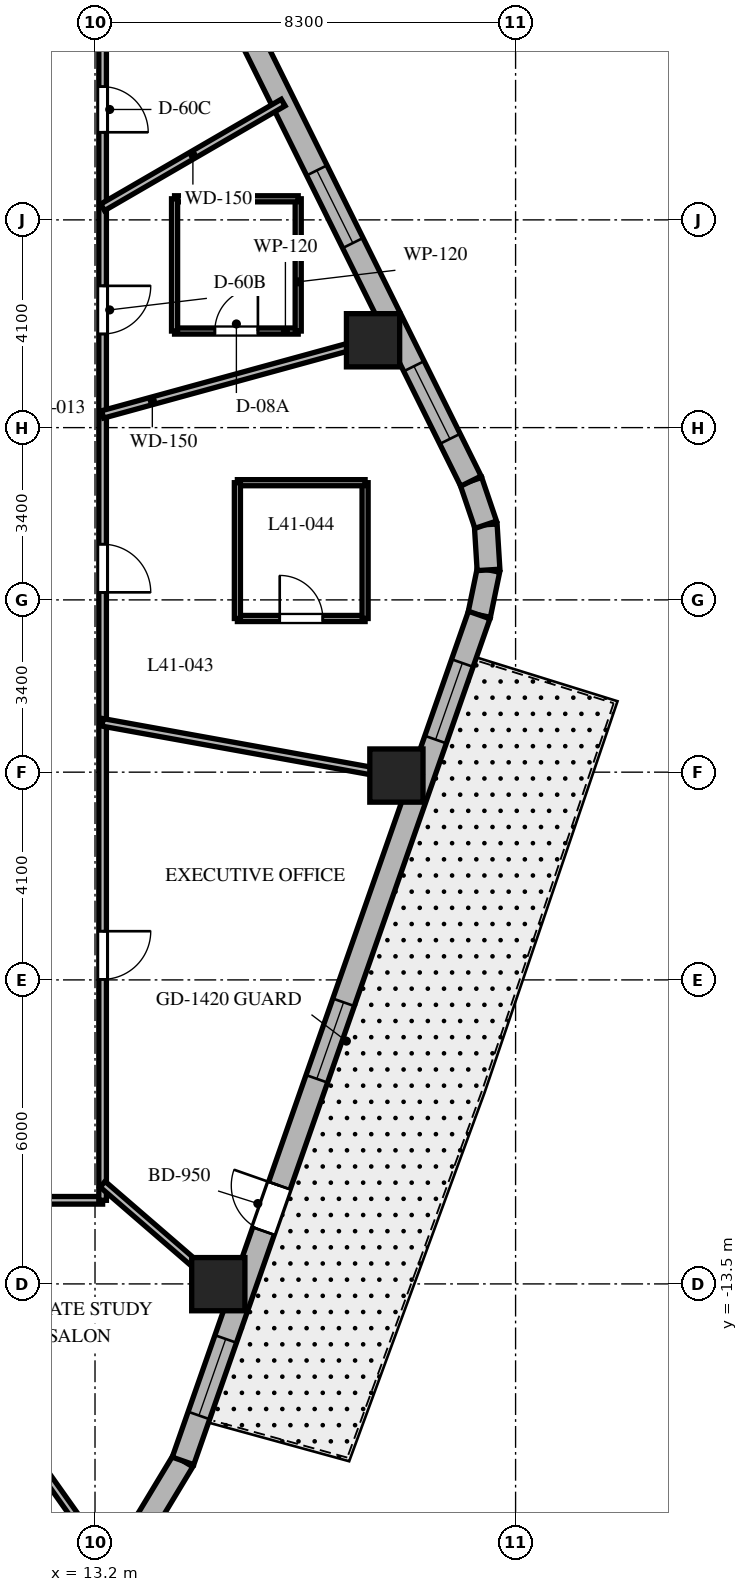
"""IFC4 building model, lengths in metres.
Left out: names, types, materials, properties, quantities, classifications, styles, units other than length and angle.
Written with IfcOpenShell. Run it as: python <this file> out.ifc"""

import sys

from ifc_helpers import new_model, si_unit, direction, frame, frame_2d, origin, origin_2d, place, context, subcontext, project, spatial, rectangle, extrude, element, fill, save


model = new_model("IFC4")
c1 = context("Model", 3, precision=1e-05, world=origin(), true_north=direction((0.0, 1.0)))
c2 = subcontext(c1, "Body", "Model", "MODEL_VIEW")
j1 = project(units=[si_unit("LENGTHUNIT", "METRE"), si_unit("PLANEANGLEUNIT", "RADIAN")], contexts=[c1])
p1 = place(None, origin())
s1 = spatial("IfcSite", under=j1, at=p1, CompositionType="ELEMENT")
p2 = place(p1, origin())
s2 = spatial("IfcBuilding", under=s1, at=p2, CompositionType="ELEMENT")
p3 = place(p2, frame((0.0, 0.0, 166.5)))
s3 = spatial("IfcBuildingStorey", under=s2, at=p3, CompositionType="ELEMENT", Elevation=166.5)
for number, where, z_axis, x_axis in (
    (1, (15.633, -13.505, 0.0), (0.0, 0.0, 1.0), (1.0, 0.0, 0.0)),
    (2, (19.148, -3.467, 0.0), (0.0, 0.0, 1.0), (1.0, 0.0, 0.0)),
    (3, (18.687, 5.124, 0.0), (0.0, 0.0, 1.0), (1.0, 0.0, 0.0)),
):
    element("IfcColumn", number, at=place(p3, frame(where, z_axis=z_axis, x_axis=x_axis)), inside=s3, PredefinedType="COLUMN", context=c2, shape_type="SweptSolid", body=[
        extrude(rectangle(XDim=1.05, YDim=1.05, at=origin_2d()), origin(), (0.0, 0.0, 1.0), 3.7),
    ])
p4 = place(p3, frame((14.214, -18.192, 0.0), z_axis=(0.0, 0.0, 1.0), x_axis=(0.516340945502, 0.856383108193, 0.0)))
e4 = element("IfcWall", 4, at=p4, inside=s3, PredefinedType="SOLIDWALL", context=c2, shape_type="SweptSolid", body=[
    extrude(rectangle(XDim=1.4, YDim=0.45, at=frame_2d((0.7, 0.0))), origin(), (0.0, 0.0, 1.0), 3.38),
])
p5 = place(p3, frame((20.782, -0.298, 0.0), z_axis=(0.0, 0.0, 1.0), x_axis=(0.202570068411, 0.979267771033, 0.0)))
e5 = element("IfcWall", 5, at=p5, inside=s3, PredefinedType="SOLIDWALL", context=c2, shape_type="SweptSolid", body=[
    extrude(rectangle(XDim=0.909, YDim=0.45, at=frame_2d((0.454, 0.0))), origin(), (0.0, 0.0, 1.0), 3.38),
])
p6 = place(p3, frame((20.966, 0.592, 0.0), z_axis=(0.0, 0.0, 1.0), x_axis=(-0.061748898935, 0.998091715966, 0.0)))
e6 = element("IfcWall", 6, at=p6, inside=s3, PredefinedType="SOLIDWALL", context=c2, shape_type="SweptSolid", body=[
    extrude(rectangle(XDim=0.894, YDim=0.45, at=frame_2d((0.447, 0.0))), origin(), (0.0, 0.0, 1.0), 3.38),
])
p7 = place(p3, frame((20.911, 1.484, 0.0), z_axis=(0.0, 0.0, 1.0), x_axis=(-0.321623334353, 0.946867694453, 0.0)))
e7 = element("IfcWall", 7, at=p7, inside=s3, PredefinedType="SOLIDWALL", context=c2, shape_type="SweptSolid", body=[
    extrude(rectangle(XDim=0.909, YDim=0.45, at=frame_2d((0.454, 0.0))), origin(), (0.0, 0.0, 1.0), 3.38),
])
p8 = place(p3, frame((14.937, -16.993, 0.0), z_axis=(0.0, 0.0, 1.0), x_axis=(0.330431575061, 0.943829949834, 0.0)))
e8 = element("IfcWall", 8, at=p8, inside=s3, PredefinedType="SOLIDWALL", context=c2, shape_type="SweptSolid", body=[
    extrude(rectangle(XDim=17.689, YDim=0.45, at=frame_2d((8.844, 0.0))), origin(), (0.0, 0.0, 1.0), 3.38),
])
p9 = place(p8, frame((4.807, 0.0, 0.0)))
e9 = element("IfcOpeningElement", 9, at=p9, cuts=e8, PredefinedType="OPENING", context=c2, shape_type="SweptSolid", body=[
    extrude(rectangle(XDim=0.95, YDim=2.15, at=frame_2d((0.475, 1.075))), frame((0.0, 0.235, 0.0), z_axis=(0.0, -1.0, 0.0), x_axis=(1.0, 0.0, 0.0)), (0.0, 0.0, 1.0), 0.47),
])
p10 = place(p8, frame((0.95, 0.0, 0.8)))
e10 = element("IfcOpeningElement", 10, at=p10, cuts=e8, PredefinedType="OPENING", context=c2, shape_type="SweptSolid", body=[
    extrude(rectangle(XDim=1.6, YDim=1.75, at=frame_2d((0.8, 0.875))), frame((0.0, 0.235, 0.0), z_axis=(0.0, -1.0, 0.0), x_axis=(1.0, 0.0, 0.0)), (0.0, 0.0, 1.0), 0.47),
])
p11 = place(p8, frame((7.99, 0.0, 0.8)))
e11 = element("IfcOpeningElement", 11, at=p11, cuts=e8, PredefinedType="OPENING", context=c2, shape_type="SweptSolid", body=[
    extrude(rectangle(XDim=1.6, YDim=1.75, at=frame_2d((0.8, 0.875))), frame((0.0, 0.235, 0.0), z_axis=(0.0, -1.0, 0.0), x_axis=(1.0, 0.0, 0.0)), (0.0, 0.0, 1.0), 0.47),
])
p12 = place(p8, frame((15.084, 0.0, 0.8)))
e12 = element("IfcOpeningElement", 12, at=p12, cuts=e8, PredefinedType="OPENING", context=c2, shape_type="SweptSolid", body=[
    extrude(rectangle(XDim=1.6, YDim=1.75, at=frame_2d((0.8, 0.875))), frame((0.0, 0.235, 0.0), z_axis=(0.0, -1.0, 0.0), x_axis=(1.0, 0.0, 0.0)), (0.0, 0.0, 1.0), 0.47),
])
p13 = place(p3, frame((20.618, 2.344, 0.0), z_axis=(0.0, 0.0, 1.0), x_axis=(-0.444243691097, 0.895905990002, 0.0)))
e13 = element("IfcWall", 13, at=p13, inside=s3, PredefinedType="SOLIDWALL", context=c2, shape_type="SweptSolid", body=[
    extrude(rectangle(XDim=16.784, YDim=0.45, at=frame_2d((8.392, 0.0))), origin(), (0.0, 0.0, 1.0), 3.38),
])
p14 = place(p13, frame((5.245, 0.0, 0.8)))
e14 = element("IfcOpeningElement", 14, at=p14, cuts=e13, PredefinedType="OPENING", context=c2, shape_type="SweptSolid", body=[
    extrude(rectangle(XDim=1.6, YDim=1.75, at=frame_2d((0.8, 0.875))), frame((0.0, 0.235, 0.0), z_axis=(0.0, -1.0, 0.0), x_axis=(1.0, 0.0, 0.0)), (0.0, 0.0, 1.0), 0.47),
])
p15 = place(p13, frame((9.936, 0.0, 0.8)))
e15 = element("IfcOpeningElement", 15, at=p15, cuts=e13, PredefinedType="OPENING", context=c2, shape_type="SweptSolid", body=[
    extrude(rectangle(XDim=1.6, YDim=1.75, at=frame_2d((0.8, 0.875))), frame((0.0, 0.235, 0.0), z_axis=(0.0, -1.0, 0.0), x_axis=(1.0, 0.0, 0.0)), (0.0, 0.0, 1.0), 0.47),
])
p16 = place(p13, frame((14.303, 0.0, 0.8)))
e16 = element("IfcOpeningElement", 16, at=p16, cuts=e13, PredefinedType="OPENING", context=c2, shape_type="SweptSolid", body=[
    extrude(rectangle(XDim=1.6, YDim=1.75, at=frame_2d((0.8, 0.875))), frame((0.0, 0.235, 0.0), z_axis=(0.0, -1.0, 0.0), x_axis=(1.0, 0.0, 0.0)), (0.0, 0.0, 1.0), 0.47),
])
p17 = place(p13, frame((0.931, 0.0, 0.8)))
e17 = element("IfcOpeningElement", 17, at=p17, cuts=e13, PredefinedType="OPENING", context=c2, shape_type="SweptSolid", body=[
    extrude(rectangle(XDim=1.6, YDim=1.75, at=frame_2d((0.8, 0.875))), frame((0.0, 0.235, 0.0), z_axis=(0.0, -1.0, 0.0), x_axis=(1.0, 0.0, 0.0)), (0.0, 0.0, 1.0), 0.47),
])
p18 = place(p3, frame((13.35, -11.85, 0.0), z_axis=(0.0, 0.0, 1.0), x_axis=(-1.0, 0.0, 0.0)))
e18 = element("IfcWall", 18, at=p18, inside=s3, PredefinedType="PARTITIONING", context=c2, shape_type="SweptSolid", body=[
    extrude(rectangle(XDim=26.7, YDim=0.15, at=frame_2d((13.35, 0.0))), origin(), (0.0, 0.0, 1.0), 2.82),
])
p19 = place(p18, frame((20.682, 0.0, 0.0)))
e19 = element("IfcOpeningElement", 19, at=p19, cuts=e18, PredefinedType="OPENING", context=c2, shape_type="SweptSolid", body=[
    extrude(rectangle(XDim=0.95, YDim=2.03, at=frame_2d((0.475, 1.015))), frame((0.0, 0.085, 0.0), z_axis=(0.0, -1.0, 0.0), x_axis=(1.0, 0.0, 0.0)), (0.0, 0.0, 1.0), 0.17),
])
p20 = place(p18, frame((14.708, 0.0, 0.0)))
e20 = element("IfcOpeningElement", 20, at=p20, cuts=e18, PredefinedType="OPENING", context=c2, shape_type="SweptSolid", body=[
    extrude(rectangle(XDim=0.95, YDim=2.03, at=frame_2d((0.475, 1.015))), frame((0.0, 0.085, 0.0), z_axis=(0.0, -1.0, 0.0), x_axis=(1.0, 0.0, 0.0)), (0.0, 0.0, 1.0), 0.17),
])
p21 = place(p18, frame((10.553, 0.0, 0.0)))
e21 = element("IfcOpeningElement", 21, at=p21, cuts=e18, PredefinedType="OPENING", context=c2, shape_type="SweptSolid", body=[
    extrude(rectangle(XDim=0.95, YDim=2.03, at=frame_2d((0.475, 1.015))), frame((0.0, 0.085, 0.0), z_axis=(0.0, -1.0, 0.0), x_axis=(1.0, 0.0, 0.0)), (0.0, 0.0, 1.0), 0.17),
])
p22 = place(p18, frame((6.353, 0.0, 0.0)))
e22 = element("IfcOpeningElement", 22, at=p22, cuts=e18, PredefinedType="OPENING", context=c2, shape_type="SweptSolid", body=[
    extrude(rectangle(XDim=0.9, YDim=2.03, at=frame_2d((0.45, 1.015))), frame((0.0, 0.085, 0.0), z_axis=(0.0, -1.0, 0.0), x_axis=(1.0, 0.0, 0.0)), (0.0, 0.0, 1.0), 0.17),
])
p23 = place(p18, frame((2.15, 0.0, 0.0)))
e23 = element("IfcOpeningElement", 23, at=p23, cuts=e18, PredefinedType="OPENING", context=c2, shape_type="SweptSolid", body=[
    extrude(rectangle(XDim=0.9, YDim=2.03, at=frame_2d((0.45, 1.015))), frame((0.0, 0.085, 0.0), z_axis=(0.0, -1.0, 0.0), x_axis=(1.0, 0.0, 0.0)), (0.0, 0.0, 1.0), 0.17),
])
p24 = place(p3, frame((13.35, 11.85, 0.0), z_axis=(0.0, 0.0, 1.0), x_axis=(0.0, -1.0, 0.0)))
e24 = element("IfcWall", 24, at=p24, inside=s3, PredefinedType="PARTITIONING", context=c2, shape_type="SweptSolid", body=[
    extrude(rectangle(XDim=23.7, YDim=0.15, at=frame_2d((11.85, 0.0))), origin(), (0.0, 0.0, 1.0), 2.82),
])
p25 = place(p24, frame((5.652, 0.0, 0.0)))
e25 = element("IfcOpeningElement", 25, at=p25, cuts=e24, PredefinedType="OPENING", context=c2, shape_type="SweptSolid", body=[
    extrude(rectangle(XDim=0.95, YDim=2.03, at=frame_2d((0.475, 1.015))), frame((0.0, 0.085, 0.0), z_axis=(0.0, -1.0, 0.0), x_axis=(1.0, 0.0, 0.0)), (0.0, 0.0, 1.0), 0.17),
])
p26 = place(p24, frame((1.721, 0.0, 0.0)))
e26 = element("IfcOpeningElement", 26, at=p26, cuts=e24, PredefinedType="OPENING", context=c2, shape_type="SweptSolid", body=[
    extrude(rectangle(XDim=0.9, YDim=2.03, at=frame_2d((0.45, 1.015))), frame((0.0, 0.085, 0.0), z_axis=(0.0, -1.0, 0.0), x_axis=(1.0, 0.0, 0.0)), (0.0, 0.0, 1.0), 0.17),
])
p27 = place(p24, frame((18.389, 0.0, 0.0)))
e27 = element("IfcOpeningElement", 27, at=p27, cuts=e24, PredefinedType="OPENING", context=c2, shape_type="SweptSolid", body=[
    extrude(rectangle(XDim=0.95, YDim=2.03, at=frame_2d((0.475, 1.015))), frame((0.0, 0.085, 0.0), z_axis=(0.0, -1.0, 0.0), x_axis=(1.0, 0.0, 0.0)), (0.0, 0.0, 1.0), 0.17),
])
p28 = place(p24, frame((10.751, 0.0, 0.0)))
e28 = element("IfcOpeningElement", 28, at=p28, cuts=e24, PredefinedType="OPENING", context=c2, shape_type="SweptSolid", body=[
    extrude(rectangle(XDim=0.95, YDim=2.03, at=frame_2d((0.475, 1.015))), frame((0.0, 0.085, 0.0), z_axis=(0.0, -1.0, 0.0), x_axis=(1.0, 0.0, 0.0)), (0.0, 0.0, 1.0), 0.17),
])
p29 = place(p3, frame((13.35, 3.661, 0.0), z_axis=(0.0, 0.0, 1.0), x_axis=(0.964397145454, 0.264458211898, 0.0)))
e29 = element("IfcWall", 29, at=p29, inside=s3, PredefinedType="PARTITIONING", context=c2, shape_type="SweptSolid", body=[
    extrude(rectangle(XDim=6.039, YDim=0.15, at=frame_2d((3.019, 0.0))), origin(), (0.0, 0.0, 1.0), 2.62),
])
p30 = place(p3, frame((13.35, 7.748, 0.0), z_axis=(0.0, 0.0, 1.0), x_axis=(0.864894342526, 0.501953958313, 0.0)))
e30 = element("IfcWall", 30, at=p30, inside=s3, PredefinedType="PARTITIONING", context=c2, shape_type="SweptSolid", body=[
    extrude(rectangle(XDim=4.12, YDim=0.15, at=frame_2d((2.06, 0.0))), origin(), (0.0, 0.0, 1.0), 2.62),
])
p31 = place(p3, frame((8.39, -11.85, 0.0), z_axis=(0.0, 0.0, 1.0), x_axis=(0.577877530264, -0.816123495566, 0.0)))
e31 = element("IfcWall", 31, at=p31, inside=s3, PredefinedType="PARTITIONING", context=c2, shape_type="SweptSolid", body=[
    extrude(rectangle(XDim=8.382, YDim=0.15, at=frame_2d((4.191, 0.0))), origin(), (0.0, 0.0, 1.0), 2.62),
])
p32 = place(p3, frame((13.35, -11.533, 0.0), z_axis=(0.0, 0.0, 1.0), x_axis=(0.756711647314, -0.65374879183, 0.0)))
e32 = element("IfcWall", 32, at=p32, inside=s3, PredefinedType="PARTITIONING", context=c2, shape_type="SweptSolid", body=[
    extrude(rectangle(XDim=3.55, YDim=0.15, at=frame_2d((1.775, 0.0))), origin(), (0.0, 0.0, 1.0), 2.62),
])
p33 = place(p3, frame((13.35, -2.417, 0.0), z_axis=(0.0, 0.0, 1.0), x_axis=(0.98399796473, -0.178179699761, 0.0)))
e33 = element("IfcWall", 33, at=p33, inside=s3, PredefinedType="PARTITIONING", context=c2, shape_type="SweptSolid", body=[
    extrude(rectangle(XDim=6.393, YDim=0.15, at=frame_2d((3.197, 0.0))), origin(), (0.0, 0.0, 1.0), 2.62),
])
p34 = place(p3, frame((14.77, 5.306, 0.0), z_axis=(0.0, 0.0, 1.0), x_axis=(1.0, 0.0, 0.0)))
e34 = element("IfcWall", 34, at=p34, inside=s3, PredefinedType="PARTITIONING", context=c2, shape_type="SweptSolid", body=[
    extrude(rectangle(XDim=2.44, YDim=0.12, at=frame_2d((1.22, 0.0))), origin(), (0.0, 0.0, 1.0), 2.82),
])
p35 = place(p34, frame((0.795, 0.0, 0.0)))
e35 = element("IfcOpeningElement", 35, at=p35, cuts=e34, PredefinedType="OPENING", context=c2, shape_type="SweptSolid", body=[
    extrude(rectangle(XDim=0.85, YDim=2.03, at=frame_2d((0.425, 1.015))), frame((0.0, 0.07, 0.0), z_axis=(0.0, -1.0, 0.0), x_axis=(1.0, 0.0, 0.0)), (0.0, 0.0, 1.0), 0.14),
])
p36 = place(p3, frame((17.21, 5.306, 0.0), z_axis=(0.0, 0.0, 1.0), x_axis=(0.0, 1.0, 0.0)))
e36 = element("IfcWall", 36, at=p36, inside=s3, PredefinedType="PARTITIONING", context=c2, shape_type="SweptSolid", body=[
    extrude(rectangle(XDim=2.61, YDim=0.12, at=frame_2d((1.305, 0.0))), origin(), (0.0, 0.0, 1.0), 2.62),
])
p37 = place(p3, frame((17.21, 7.916, 0.0), z_axis=(0.0, 0.0, 1.0), x_axis=(-1.0, 0.0, 0.0)))
e37 = element("IfcWall", 37, at=p37, inside=s3, PredefinedType="PARTITIONING", context=c2, shape_type="SweptSolid", body=[
    extrude(rectangle(XDim=2.44, YDim=0.12, at=frame_2d((1.22, 0.0))), origin(), (0.0, 0.0, 1.0), 2.62),
])
p38 = place(p3, frame((14.77, 7.916, 0.0), z_axis=(0.0, 0.0, 1.0), x_axis=(0.0, -1.0, 0.0)))
e38 = element("IfcWall", 38, at=p38, inside=s3, PredefinedType="PARTITIONING", context=c2, shape_type="SweptSolid", body=[
    extrude(rectangle(XDim=2.61, YDim=0.12, at=frame_2d((1.305, 0.0))), origin(), (0.0, 0.0, 1.0), 2.82),
])
p39 = place(p3, frame((16.01, -0.367, 0.0), z_axis=(0.0, 0.0, 1.0), x_axis=(1.0, 0.0, 0.0)))
e39 = element("IfcWall", 39, at=p39, inside=s3, PredefinedType="PARTITIONING", context=c2, shape_type="SweptSolid", body=[
    extrude(rectangle(XDim=2.52, YDim=0.12, at=frame_2d((1.26, 0.0))), origin(), (0.0, 0.0, 1.0), 3.38),
])
p40 = place(p39, frame((0.835, 0.0, 0.0)))
e40 = element("IfcOpeningElement", 40, at=p40, cuts=e39, PredefinedType="OPENING", context=c2, shape_type="SweptSolid", body=[
    extrude(rectangle(XDim=0.85, YDim=2.03, at=frame_2d((0.425, 1.015))), frame((0.0, 0.07, 0.0), z_axis=(0.0, -1.0, 0.0), x_axis=(1.0, 0.0, 0.0)), (0.0, 0.0, 1.0), 0.14),
])
p41 = place(p3, frame((18.53, -0.367, 0.0), z_axis=(0.0, 0.0, 1.0), x_axis=(0.0, 1.0, 0.0)))
e41 = element("IfcWall", 41, at=p41, inside=s3, PredefinedType="PARTITIONING", context=c2, shape_type="SweptSolid", body=[
    extrude(rectangle(XDim=2.68, YDim=0.12, at=frame_2d((1.34, 0.0))), origin(), (0.0, 0.0, 1.0), 2.62),
])
p42 = place(p3, frame((18.53, 2.313, 0.0), z_axis=(0.0, 0.0, 1.0), x_axis=(-1.0, 0.0, 0.0)))
e42 = element("IfcWall", 42, at=p42, inside=s3, PredefinedType="PARTITIONING", context=c2, shape_type="SweptSolid", body=[
    extrude(rectangle(XDim=2.52, YDim=0.12, at=frame_2d((1.26, 0.0))), origin(), (0.0, 0.0, 1.0), 3.38),
])
p43 = place(p3, frame((16.01, 2.313, 0.0), z_axis=(0.0, 0.0, 1.0), x_axis=(0.0, -1.0, 0.0)))
e43 = element("IfcWall", 43, at=p43, inside=s3, PredefinedType="PARTITIONING", context=c2, shape_type="SweptSolid", body=[
    extrude(rectangle(XDim=2.68, YDim=0.12, at=frame_2d((1.34, 0.0))), origin(), (0.0, 0.0, 1.0), 3.38),
])
p44 = place(p9, origin())
e44 = element("IfcDoor", 44, at=p44, inside=s3, OperationType="SINGLE_SWING_RIGHT", PredefinedType="DOOR", context=c2, shape_type="SweptSolid", body=[
    extrude(rectangle(XDim=0.95, YDim=2.15, at=frame_2d((0.475, 1.075))), frame((0.0, 0.025, 0.0), z_axis=(0.0, -1.0, 0.0), x_axis=(1.0, 0.0, 0.0)), (0.0, 0.0, 1.0), 0.05),
])
fill(e9, e44)
p45 = place(p10, origin())
e45 = element("IfcWindow", 45, at=p45, inside=s3, PartitioningType="SINGLE_PANEL", PredefinedType="WINDOW", context=c2, shape_type="SweptSolid", body=[
    extrude(rectangle(XDim=1.6, YDim=1.75, at=frame_2d((0.8, 0.875))), frame((0.0, 0.03, 0.0), z_axis=(0.0, -1.0, 0.0), x_axis=(1.0, 0.0, 0.0)), (0.0, 0.0, 1.0), 0.06),
])
fill(e10, e45)
p46 = place(p11, origin())
e46 = element("IfcWindow", 46, at=p46, inside=s3, PartitioningType="SINGLE_PANEL", PredefinedType="WINDOW", context=c2, shape_type="SweptSolid", body=[
    extrude(rectangle(XDim=1.6, YDim=1.75, at=frame_2d((0.8, 0.875))), frame((0.0, 0.03, 0.0), z_axis=(0.0, -1.0, 0.0), x_axis=(1.0, 0.0, 0.0)), (0.0, 0.0, 1.0), 0.06),
])
fill(e11, e46)
p47 = place(p12, origin())
e47 = element("IfcWindow", 47, at=p47, inside=s3, PartitioningType="SINGLE_PANEL", PredefinedType="WINDOW", context=c2, shape_type="SweptSolid", body=[
    extrude(rectangle(XDim=1.6, YDim=1.75, at=frame_2d((0.8, 0.875))), frame((0.0, 0.03, 0.0), z_axis=(0.0, -1.0, 0.0), x_axis=(1.0, 0.0, 0.0)), (0.0, 0.0, 1.0), 0.06),
])
fill(e12, e47)
p48 = place(p14, origin())
e48 = element("IfcWindow", 48, at=p48, inside=s3, PartitioningType="SINGLE_PANEL", PredefinedType="WINDOW", context=c2, shape_type="SweptSolid", body=[
    extrude(rectangle(XDim=1.6, YDim=1.75, at=frame_2d((0.8, 0.875))), frame((0.0, 0.03, 0.0), z_axis=(0.0, -1.0, 0.0), x_axis=(1.0, 0.0, 0.0)), (0.0, 0.0, 1.0), 0.06),
])
fill(e14, e48)
p49 = place(p17, origin())
e49 = element("IfcWindow", 49, at=p49, inside=s3, PartitioningType="SINGLE_PANEL", PredefinedType="WINDOW", context=c2, shape_type="SweptSolid", body=[
    extrude(rectangle(XDim=1.6, YDim=1.75, at=frame_2d((0.8, 0.875))), frame((0.0, 0.03, 0.0), z_axis=(0.0, -1.0, 0.0), x_axis=(1.0, 0.0, 0.0)), (0.0, 0.0, 1.0), 0.06),
])
fill(e17, e49)
p50 = place(p25, origin())
e50 = element("IfcDoor", 50, at=p50, inside=s3, OperationType="SINGLE_SWING_LEFT", PredefinedType="DOOR", context=c2, shape_type="SweptSolid", body=[
    extrude(rectangle(XDim=0.95, YDim=2.03, at=frame_2d((0.475, 1.015))), frame((0.0, 0.025, 0.0), z_axis=(0.0, -1.0, 0.0), x_axis=(1.0, 0.0, 0.0)), (0.0, 0.0, 1.0), 0.05),
])
fill(e25, e50)
p51 = place(p35, origin())
e51 = element("IfcDoor", 51, at=p51, inside=s3, OperationType="SINGLE_SWING_RIGHT", PredefinedType="DOOR", context=c2, shape_type="SweptSolid", body=[
    extrude(rectangle(XDim=0.85, YDim=2.03, at=frame_2d((0.425, 1.015))), frame((0.0, 0.025, 0.0), z_axis=(0.0, -1.0, 0.0), x_axis=(1.0, 0.0, 0.0)), (0.0, 0.0, 1.0), 0.05),
])
fill(e35, e51)
p52 = place(p26, origin())
e52 = element("IfcDoor", 52, at=p52, inside=s3, OperationType="SINGLE_SWING_RIGHT", PredefinedType="DOOR", context=c2, shape_type="SweptSolid", body=[
    extrude(rectangle(XDim=0.9, YDim=2.03, at=frame_2d((0.45, 1.015))), frame((0.0, 0.025, 0.0), z_axis=(0.0, -1.0, 0.0), x_axis=(1.0, 0.0, 0.0)), (0.0, 0.0, 1.0), 0.05),
])
fill(e26, e52)
p53 = place(p27, origin())
e53 = element("IfcDoor", 53, at=p53, inside=s3, OperationType="SINGLE_SWING_LEFT", PredefinedType="DOOR", context=c2, shape_type="SweptSolid", body=[
    extrude(rectangle(XDim=0.95, YDim=2.03, at=frame_2d((0.475, 1.015))), frame((0.0, 0.025, 0.0), z_axis=(0.0, -1.0, 0.0), x_axis=(1.0, 0.0, 0.0)), (0.0, 0.0, 1.0), 0.05),
])
fill(e27, e53)
p54 = place(p28, origin())
e54 = element("IfcDoor", 54, at=p54, inside=s3, OperationType="SINGLE_SWING_RIGHT", PredefinedType="DOOR", context=c2, shape_type="SweptSolid", body=[
    extrude(rectangle(XDim=0.95, YDim=2.03, at=frame_2d((0.475, 1.015))), frame((0.0, 0.025, 0.0), z_axis=(0.0, -1.0, 0.0), x_axis=(1.0, 0.0, 0.0)), (0.0, 0.0, 1.0), 0.05),
])
fill(e28, e54)
p55 = place(p40, origin())
e55 = element("IfcDoor", 55, at=p55, inside=s3, OperationType="SINGLE_SWING_LEFT", PredefinedType="DOOR", context=c2, shape_type="SweptSolid", body=[
    extrude(rectangle(XDim=0.85, YDim=2.03, at=frame_2d((0.425, 1.015))), frame((0.0, 0.025, 0.0), z_axis=(0.0, -1.0, 0.0), x_axis=(1.0, 0.0, 0.0)), (0.0, 0.0, 1.0), 0.05),
])
fill(e40, e55)
save(model, sys.argv[1])
